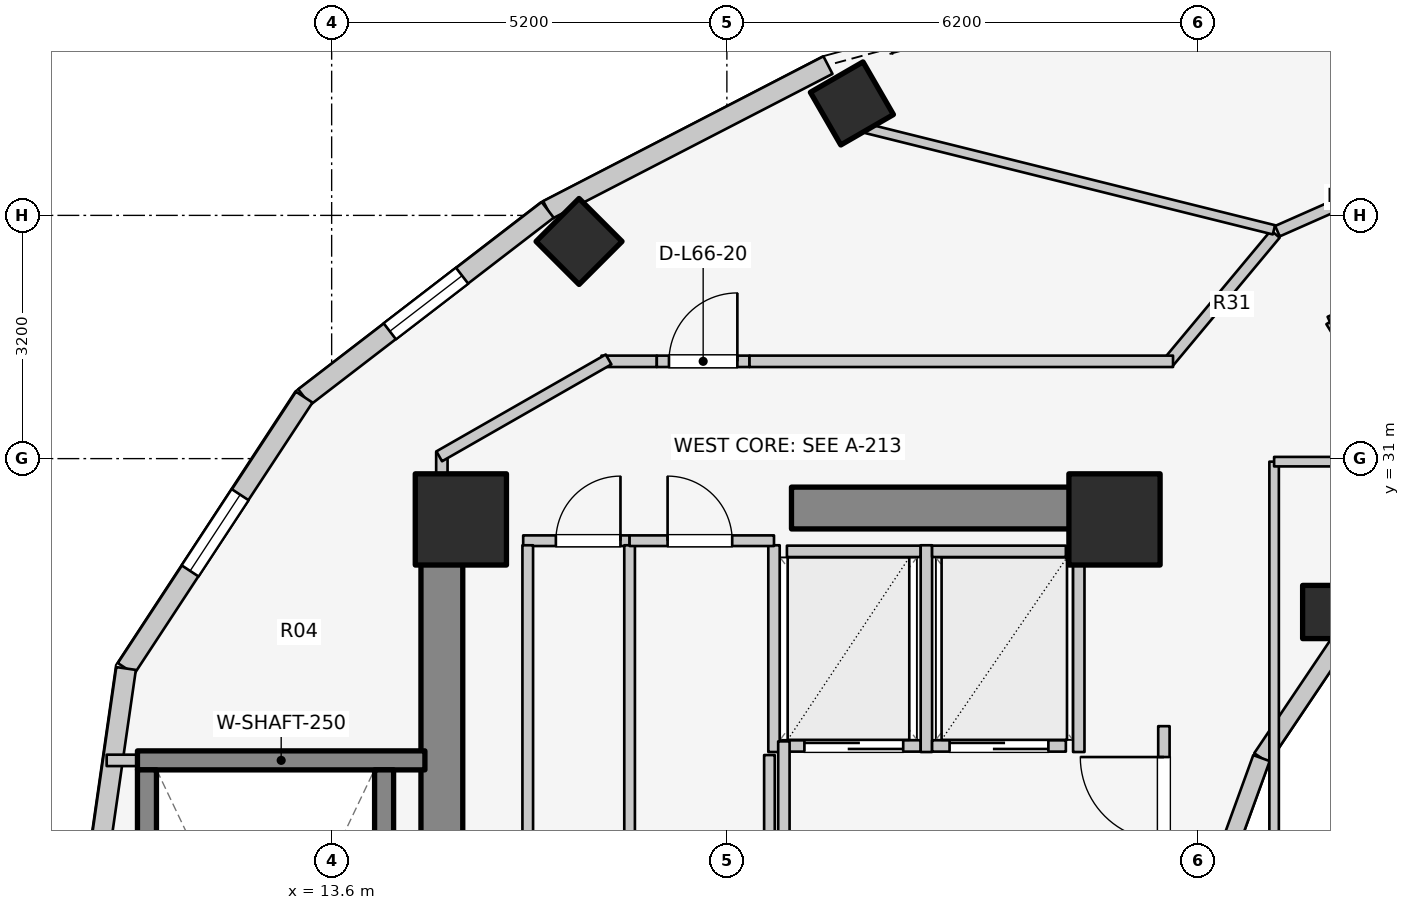
"""IFC4 building model, lengths in metres.
Left out: names, types, materials, properties, quantities, classifications, styles, units other than length and angle.
Written with IfcOpenShell. Run it as: python <this file> out.ifc"""

import sys

from ifc_helpers import new_model, si_unit, direction, frame, frame_2d, origin, origin_2d, place, context, subcontext, project, spatial, rectangle, extrude, element, fill, save


model = new_model("IFC4")
c1 = context("Model", 3, precision=1e-05, world=origin(), true_north=direction((0.0, 1.0)))
c2 = subcontext(c1, "Body", "Model", "MODEL_VIEW")
j1 = project(units=[si_unit("LENGTHUNIT", "METRE"), si_unit("PLANEANGLEUNIT", "RADIAN")], contexts=[c1])
p1 = place(None, origin())
s1 = spatial("IfcSite", under=j1, at=p1, CompositionType="ELEMENT")
p2 = place(p1, origin())
s2 = spatial("IfcBuilding", under=s1, at=p2, CompositionType="ELEMENT")
p3 = place(p2, frame((0.0, 0.0, 217.1)))
s3 = spatial("IfcBuildingStorey", under=s2, at=p3, CompositionType="ELEMENT", Elevation=217.1)
p4 = place(p3, frame((15.05, 17.05, 0.0), z_axis=(0.0, 0.0, 1.0), x_axis=(0.0, 1.0, 0.0)))
e1 = element("IfcWall", 1, at=p4, inside=s3, PredefinedType="SHEAR", context=c2, shape_type="SweptSolid", body=[
    extrude(rectangle(XDim=12.8, YDim=0.55, at=frame_2d((6.4, 0.0))), origin(), (0.0, 0.0, 1.0), 3.1),
])
p5 = place(p3, frame((19.65, 30.35, 0.0), z_axis=(0.0, 0.0, 1.0), x_axis=(1.0, 0.0, 0.0)))
e2 = element("IfcWall", 2, at=p5, inside=s3, PredefinedType="SHEAR", context=c2, shape_type="SweptSolid", body=[
    extrude(rectangle(XDim=4.5, YDim=0.55, at=frame_2d((2.25, 0.0))), origin(), (0.0, 0.0, 1.0), 3.1),
])
p6 = place(p3, frame((11.045, 27.03, 0.0), z_axis=(0.0, 0.0, 1.0), x_axis=(1.0, 0.0, 0.0)))
e3 = element("IfcWall", 3, at=p6, inside=s3, PredefinedType="SOLIDWALL", context=c2, shape_type="SweptSolid", body=[
    extrude(rectangle(XDim=3.782, YDim=0.25, at=frame_2d((1.891, 0.0))), origin(), (0.0, 0.0, 1.0), 3.1),
])
for number, where, z_axis, x_axis in (
    (4, (11.17, 19.095, 0.0), (0.0, 0.0, 1.0), (0.0, 1.0, 0.0)),
    (5, (14.29, 19.095, 0.0), (0.0, 0.0, 1.0), (0.0, 1.0, 0.0)),
):
    element("IfcWall", number, at=place(p3, frame(where, z_axis=z_axis, x_axis=x_axis)), inside=s3, PredefinedType="SOLIDWALL", context=c2, shape_type="SweptSolid", body=[
        extrude(rectangle(XDim=7.81, YDim=0.25, at=frame_2d((3.905, 0.0))), origin(), (0.0, 0.0, 1.0), 3.1),
    ])
for number, where, z_axis, x_axis in (
    (6, (23.9, 30.2, 0.0), (0.0, 0.0, 1.0), (1.0, 0.0, 0.0)),
    (7, (15.3, 30.2, 0.0), (0.0, 0.0, 1.0), (1.0, 0.0, 0.0)),
):
    element("IfcColumn", number, at=place(p3, frame(where, z_axis=z_axis, x_axis=x_axis)), inside=s3, PredefinedType="COLUMN", context=c2, shape_type="SweptSolid", body=[
        extrude(rectangle(XDim=1.2, YDim=1.2, at=origin_2d()), origin(), (0.0, 0.0, 1.0), 3.1),
    ])
p7 = place(p3, frame((20.445, 35.673, 0.0), z_axis=(0.0, 0.0, 1.0), x_axis=(-0.5, 0.866025403784, 0.0)))
e8 = element("IfcColumn", 8, at=p7, inside=s3, PredefinedType="COLUMN", context=c2, shape_type="SweptSolid", body=[
    extrude(rectangle(XDim=0.8, YDim=0.8, at=origin_2d()), origin(), (0.0, 0.0, 1.0), 3.1),
])
p8 = place(p3, frame((26.725, 28.982, 0.0), z_axis=(0.0, 0.0, 1.0), x_axis=(1.0, 0.0, 0.0)))
e9 = element("IfcColumn", 9, at=p8, inside=s3, PredefinedType="COLUMN", context=c2, shape_type="SweptSolid", body=[
    extrude(rectangle(XDim=0.7, YDim=0.7, at=origin_2d()), origin(), (0.0, 0.0, 1.0), 3.1),
])
p9 = place(p3, frame((16.855, 33.857, 0.0), z_axis=(0.0, 0.0, 1.0), x_axis=(-0.707106781187, 0.707106781187, 0.0)))
e10 = element("IfcColumn", 10, at=p9, inside=s3, PredefinedType="COLUMN", context=c2, shape_type="SweptSolid", body=[
    extrude(rectangle(XDim=0.8, YDim=0.8, at=origin_2d()), origin(), (0.0, 0.0, 1.0), 3.1),
])
p10 = place(p3, frame((26.965, 28.742, 0.0), z_axis=(0.0, 0.0, 1.0), x_axis=(-0.558197800898, -0.829707909492, 0.0)))
e11 = element("IfcWall", 11, at=p10, inside=s3, PredefinedType="STANDARD", context=c2, shape_type="SweptSolid", body=[
    extrude(rectangle(XDim=2.027, YDim=0.23, at=frame_2d((1.013, 0.0))), origin(), (0.0, 0.0, 1.0), 1.22),
])
p11 = place(p3, frame((25.834, 27.06, 0.0), z_axis=(0.0, 0.0, 1.0), x_axis=(-0.341423187295, -0.93990968033, 0.0)))
e12 = element("IfcWall", 12, at=p11, inside=s3, PredefinedType="STANDARD", context=c2, shape_type="SweptSolid", body=[
    extrude(rectangle(XDim=2.084, YDim=0.23, at=frame_2d((1.042, 0.0))), origin(), (0.0, 0.0, 1.0), 2.56),
])
p12 = place(p3, frame((20.13, 36.177, 0.0), z_axis=(0.0, 0.0, 1.0), x_axis=(-0.88849146803, -0.458893137057, 0.0)))
e13 = element("IfcWall", 13, at=p12, inside=s3, PredefinedType="STANDARD", context=c2, shape_type="SweptSolid", body=[
    extrude(rectangle(XDim=4.15, YDim=0.26, at=frame_2d((2.075, 0.0))), origin(), (0.0, 0.0, 1.0), 1.22),
])
p13 = place(p3, frame((16.442, 34.272, 0.0), z_axis=(0.0, 0.0, 1.0), x_axis=(-0.792713817907, -0.609593965603, 0.0)))
e14 = element("IfcWall", 14, at=p13, inside=s3, PredefinedType="STANDARD", context=c2, shape_type="SweptSolid", body=[
    extrude(rectangle(XDim=4.041, YDim=0.26, at=frame_2d((2.021, 0.0))), origin(), (0.0, 0.0, 1.0), 1.22),
])
p14 = place(p13, frame((1.42, 0.0, 0.15)))
e15 = element("IfcOpeningElement", 15, at=p14, cuts=e14, PredefinedType="OPENING", context=c2, shape_type="SweptSolid", body=[
    extrude(rectangle(XDim=1.2, YDim=0.9, at=frame_2d((0.6, 0.45))), frame((0.0, 0.14, 0.0), z_axis=(0.0, -1.0, 0.0), x_axis=(1.0, 0.0, 0.0)), (0.0, 0.0, 1.0), 0.28),
])
p15 = place(p3, frame((13.239, 31.809, 0.0), z_axis=(0.0, 0.0, 1.0), x_axis=(-0.548776305075, -0.835969238064, 0.0)))
e16 = element("IfcWall", 16, at=p15, inside=s3, PredefinedType="STANDARD", context=c2, shape_type="SweptSolid", body=[
    extrude(rectangle(XDim=4.271, YDim=0.26, at=frame_2d((2.135, 0.0))), origin(), (0.0, 0.0, 1.0), 1.22),
])
p16 = place(p15, frame((1.535, 0.0, 0.15)))
e17 = element("IfcOpeningElement", 17, at=p16, cuts=e16, PredefinedType="OPENING", context=c2, shape_type="SweptSolid", body=[
    extrude(rectangle(XDim=1.2, YDim=0.9, at=frame_2d((0.6, 0.45))), frame((0.0, 0.14, 0.0), z_axis=(0.0, -1.0, 0.0), x_axis=(1.0, 0.0, 0.0)), (0.0, 0.0, 1.0), 0.28),
])
p17 = place(p3, frame((10.895, 28.239, 0.0), z_axis=(0.0, 0.0, 1.0), x_axis=(-0.142712754019, -0.989764148593, 0.0)))
e18 = element("IfcWall", 18, at=p17, inside=s3, PredefinedType="STANDARD", context=c2, shape_type="SweptSolid", body=[
    extrude(rectangle(XDim=5.293, YDim=0.26, at=frame_2d((2.646, 0.0))), origin(), (0.0, 0.0, 1.0), 2.57),
])
p18 = place(p17, frame((2.635, 0.0, 0.75)))
e19 = element("IfcOpeningElement", 19, at=p18, cuts=e18, PredefinedType="OPENING", context=c2, shape_type="SweptSolid", body=[
    extrude(rectangle(XDim=1.2, YDim=1.5, at=frame_2d((0.6, 0.75))), frame((0.0, 0.14, 0.0), z_axis=(0.0, -1.0, 0.0), x_axis=(1.0, 0.0, 0.0)), (0.0, 0.0, 1.0), 0.28),
])
p19 = place(p3, frame((19.59, 27.22, 0.0), z_axis=(0.0, 0.0, 1.0), x_axis=(1.0, 0.0, 0.0)))
e20 = element("IfcWall", 20, at=p19, inside=s3, PredefinedType="SOLIDWALL", context=c2, shape_type="SweptSolid", body=[
    extrude(rectangle(XDim=1.76, YDim=0.15, at=frame_2d((0.88, 0.0))), origin(), (0.0, 0.0, 1.0), 2.575),
])
p20 = place(p19, frame((0.23, 0.0, 0.0)))
e21 = element("IfcOpeningElement", 21, at=p20, cuts=e20, PredefinedType="OPENING", context=c2, shape_type="SweptSolid", body=[
    extrude(rectangle(XDim=1.3, YDim=2.1, at=frame_2d((0.65, 1.05))), frame((0.0, 0.085, 0.0), z_axis=(0.0, -1.0, 0.0), x_axis=(1.0, 0.0, 0.0)), (0.0, 0.0, 1.0), 0.17),
])
p21 = place(p3, frame((19.59, 29.78, 0.0), z_axis=(0.0, 0.0, 1.0), x_axis=(1.0, 0.0, 0.0)))
e22 = element("IfcWall", 22, at=p21, inside=s3, PredefinedType="SOLIDWALL", context=c2, shape_type="SweptSolid", body=[
    extrude(rectangle(XDim=1.76, YDim=0.15, at=frame_2d((0.88, 0.0))), origin(), (0.0, 0.0, 1.0), 2.575),
])
for number, where, z_axis, x_axis in (
    (23, (19.42, 27.14, 0.0), (0.0, 0.0, 1.0), (0.0, 1.0, 0.0)),
    (24, (21.425, 27.14, 0.0), (0.0, 0.0, 1.0), (0.0, 1.0, 0.0)),
):
    element("IfcWall", number, at=place(p3, frame(where, z_axis=z_axis, x_axis=x_axis)), inside=s3, PredefinedType="SOLIDWALL", context=c2, shape_type="SweptSolid", body=[
        extrude(rectangle(XDim=2.72, YDim=0.15, at=frame_2d((1.36, 0.0))), origin(), (0.0, 0.0, 1.0), 2.575),
    ])
p22 = place(p3, frame((21.5, 27.22, 0.0), z_axis=(0.0, 0.0, 1.0), x_axis=(1.0, 0.0, 0.0)))
e25 = element("IfcWall", 25, at=p22, inside=s3, PredefinedType="SOLIDWALL", context=c2, shape_type="SweptSolid", body=[
    extrude(rectangle(XDim=1.76, YDim=0.15, at=frame_2d((0.88, 0.0))), origin(), (0.0, 0.0, 1.0), 2.575),
])
p23 = place(p22, frame((0.23, 0.0, 0.0)))
e26 = element("IfcOpeningElement", 26, at=p23, cuts=e25, PredefinedType="OPENING", context=c2, shape_type="SweptSolid", body=[
    extrude(rectangle(XDim=1.3, YDim=2.1, at=frame_2d((0.65, 1.05))), frame((0.0, 0.085, 0.0), z_axis=(0.0, -1.0, 0.0), x_axis=(1.0, 0.0, 0.0)), (0.0, 0.0, 1.0), 0.17),
])
p24 = place(p3, frame((21.5, 29.78, 0.0), z_axis=(0.0, 0.0, 1.0), x_axis=(1.0, 0.0, 0.0)))
e27 = element("IfcWall", 27, at=p24, inside=s3, PredefinedType="SOLIDWALL", context=c2, shape_type="SweptSolid", body=[
    extrude(rectangle(XDim=1.76, YDim=0.15, at=frame_2d((0.88, 0.0))), origin(), (0.0, 0.0, 1.0), 2.575),
])
p25 = place(p3, frame((23.43, 27.14, 0.0), z_axis=(0.0, 0.0, 1.0), x_axis=(0.0, 1.0, 0.0)))
e28 = element("IfcWall", 28, at=p25, inside=s3, PredefinedType="SOLIDWALL", context=c2, shape_type="SweptSolid", body=[
    extrude(rectangle(XDim=2.72, YDim=0.15, at=frame_2d((1.36, 0.0))), origin(), (0.0, 0.0, 1.0), 2.575),
])
p26 = place(p3, frame((19.55, 24.08, 0.0), z_axis=(0.0, 0.0, 1.0), x_axis=(0.0, 1.0, 0.0)))
e29 = element("IfcWall", 29, at=p26, inside=s3, PredefinedType="PARTITIONING", context=c2, shape_type="SweptSolid", body=[
    extrude(rectangle(XDim=3.2, YDim=0.15, at=frame_2d((1.6, 0.0))), origin(), (0.0, 0.0, 1.0), 2.575),
])
p27 = place(p3, frame((24.55, 24.08, 0.0), z_axis=(0.0, 0.0, 1.0), x_axis=(0.0, 1.0, 0.0)))
e30 = element("IfcWall", 30, at=p27, inside=s3, PredefinedType="PARTITIONING", context=c2, shape_type="SweptSolid", body=[
    extrude(rectangle(XDim=3.4, YDim=0.15, at=frame_2d((1.7, 0.0))), origin(), (0.0, 0.0, 1.0), 2.575),
])
p28 = place(p27, frame((1.894, 0.0, 0.0)))
e31 = element("IfcOpeningElement", 31, at=p28, cuts=e30, PredefinedType="OPENING", context=c2, shape_type="SweptSolid", body=[
    extrude(rectangle(XDim=1.1, YDim=2.1, at=frame_2d((0.55, 1.05))), frame((0.0, 0.085, 0.0), z_axis=(0.0, -1.0, 0.0), x_axis=(1.0, 0.0, 0.0)), (0.0, 0.0, 1.0), 0.17),
])
p29 = place(p3, frame((16.12, 29.92, 0.0), z_axis=(0.0, 0.0, 1.0), x_axis=(1.0, 0.0, 0.0)))
e32 = element("IfcWall", 32, at=p29, inside=s3, PredefinedType="PLUMBINGWALL", context=c2, shape_type="SweptSolid", body=[
    extrude(rectangle(XDim=1.4, YDim=0.14, at=frame_2d((0.7, 0.0))), origin(), (0.0, 0.0, 1.0), 2.575),
])
p30 = place(p29, frame((0.43, 0.0, 0.0)))
e33 = element("IfcOpeningElement", 33, at=p30, cuts=e32, PredefinedType="OPENING", context=c2, shape_type="SweptSolid", body=[
    extrude(rectangle(XDim=0.85, YDim=2.05, at=frame_2d((0.425, 1.025))), frame((0.0, 0.08, 0.0), z_axis=(0.0, -1.0, 0.0), x_axis=(1.0, 0.0, 0.0)), (0.0, 0.0, 1.0), 0.16),
])
for number, where, z_axis, x_axis in (
    (34, (16.18, 25.98, 0.0), (0.0, 0.0, 1.0), (0.0, 1.0, 0.0)),
    (35, (17.52, 25.98, 0.0), (0.0, 0.0, 1.0), (0.0, 1.0, 0.0)),
):
    element("IfcWall", number, at=place(p3, frame(where, z_axis=z_axis, x_axis=x_axis)), inside=s3, PredefinedType="PLUMBINGWALL", context=c2, shape_type="SweptSolid", body=[
        extrude(rectangle(XDim=3.88, YDim=0.14, at=frame_2d((1.94, 0.0))), origin(), (0.0, 0.0, 1.0), 2.575),
    ])
p31 = place(p3, frame((17.52, 29.92, 0.0), z_axis=(0.0, 0.0, 1.0), x_axis=(1.0, 0.0, 0.0)))
e36 = element("IfcWall", 36, at=p31, inside=s3, PredefinedType="PLUMBINGWALL", context=c2, shape_type="SweptSolid", body=[
    extrude(rectangle(XDim=1.9, YDim=0.14, at=frame_2d((0.95, 0.0))), origin(), (0.0, 0.0, 1.0), 2.575),
])
p32 = place(p31, frame((0.5, 0.0, 0.0)))
e37 = element("IfcOpeningElement", 37, at=p32, cuts=e36, PredefinedType="OPENING", context=c2, shape_type="SweptSolid", body=[
    extrude(rectangle(XDim=0.85, YDim=2.05, at=frame_2d((0.425, 1.025))), frame((0.0, 0.08, 0.0), z_axis=(0.0, -1.0, 0.0), x_axis=(1.0, 0.0, 0.0)), (0.0, 0.0, 1.0), 0.16),
])
p33 = place(p3, frame((19.36, 25.98, 0.0), z_axis=(0.0, 0.0, 1.0), x_axis=(0.0, 1.0, 0.0)))
e38 = element("IfcWall", 38, at=p33, inside=s3, PredefinedType="PLUMBINGWALL", context=c2, shape_type="SweptSolid", body=[
    extrude(rectangle(XDim=1.12, YDim=0.14, at=frame_2d((0.56, 0.0))), origin(), (0.0, 0.0, 1.0), 2.575),
])
p34 = place(p3, frame((28.45, 30.015, 0.0), z_axis=(0.0, 0.0, 1.0), x_axis=(-0.522763432117, 0.852477796802, 0.0)))
e39 = element("IfcWall", 39, at=p34, inside=s3, PredefinedType="PARTITIONING", context=c2, shape_type="SweptSolid", body=[
    extrude(rectangle(XDim=3.269, YDim=0.125, at=frame_2d((1.635, 0.0))), origin(), (0.0, 0.0, 1.0), 1.22),
])
p35 = place(p3, frame((27.858, 33.299, 0.0), z_axis=(0.0, 0.0, 1.0), x_axis=(-0.91321306925, -0.407482380172, 0.0)))
e40 = element("IfcWall", 40, at=p35, inside=s3, PredefinedType="PARTITIONING", context=c2, shape_type="SweptSolid", body=[
    extrude(rectangle(XDim=1.23, YDim=0.15, at=frame_2d((0.615, 0.0))), origin(), (0.0, 0.0, 1.0), 2.16),
])
p36 = place(p35, frame((0.16, 0.0, 0.0)))
e41 = element("IfcOpeningElement", 41, at=p36, cuts=e40, PredefinedType="OPENING", context=c2, shape_type="SweptSolid", body=[
    extrude(rectangle(XDim=0.95, YDim=2.1, at=frame_2d((0.475, 1.05))), frame((0.0, 0.085, 0.0), z_axis=(0.0, -1.0, 0.0), x_axis=(1.0, 0.0, 0.0)), (0.0, 0.0, 1.0), 0.17),
])
p37 = place(p3, frame((26.0, 25.8, 0.0), z_axis=(0.0, 0.0, 1.0), x_axis=(0.0, 1.0, 0.0)))
e42 = element("IfcWall", 42, at=p37, inside=s3, PredefinedType="PARTITIONING", context=c2, shape_type="SweptSolid", body=[
    extrude(rectangle(XDim=5.16, YDim=0.125, at=frame_2d((2.58, 0.0))), origin(), (0.0, 0.0, 1.0), 1.952),
])
p38 = place(p3, frame((26.0, 30.96, 0.0), z_axis=(0.0, 0.0, 1.0), x_axis=(1.0, 0.0, 0.0)))
e43 = element("IfcWall", 43, at=p38, inside=s3, PredefinedType="PARTITIONING", context=c2, shape_type="SweptSolid", body=[
    extrude(rectangle(XDim=2.6, YDim=0.125, at=frame_2d((1.3, 0.0))), origin(), (0.0, 0.0, 1.0), 1.22),
])
p39 = place(p3, frame((10.64, 27.03, 0.0), z_axis=(0.0, 0.0, 1.0), x_axis=(1.0, 0.0, 0.0)))
e44 = element("IfcWall", 44, at=p39, inside=s3, PredefinedType="PARTITIONING", context=c2, shape_type="SweptSolid", body=[
    extrude(rectangle(XDim=0.4, YDim=0.15, at=frame_2d((0.2, 0.0))), origin(), (0.0, 0.0, 1.0), 2.575),
])
p40 = place(p3, frame((15.05, 29.8, 0.0), z_axis=(0.0, 0.0, 1.0), x_axis=(0.0, 1.0, 0.0)))
e45 = element("IfcWall", 45, at=p40, inside=s3, PredefinedType="PARTITIONING", context=c2, shape_type="SweptSolid", body=[
    extrude(rectangle(XDim=1.29, YDim=0.15, at=frame_2d((0.645, 0.0))), origin(), (0.0, 0.0, 1.0), 1.22),
])
p41 = place(p3, frame((26.016, 33.955, 0.0), z_axis=(0.0, 0.0, 1.0), x_axis=(-0.64030392053, -0.76812166312, 0.0)))
e46 = element("IfcWall", 46, at=p41, inside=s3, PredefinedType="PARTITIONING", context=c2, shape_type="SweptSolid", body=[
    extrude(rectangle(XDim=2.21, YDim=0.15, at=frame_2d((1.105, 0.0))), origin(), (0.0, 0.0, 1.0), 1.22),
])
p42 = place(p3, frame((17.15, 32.28, 0.0), z_axis=(0.0, 0.0, 1.0), x_axis=(1.0, 0.0, 0.0)))
e47 = element("IfcWall", 47, at=p42, inside=s3, PredefinedType="PARTITIONING", context=c2, shape_type="SweptSolid", body=[
    extrude(rectangle(XDim=0.728, YDim=0.15, at=frame_2d((0.364, 0.0))), origin(), (0.0, 0.0, 1.0), 2.575),
])
p43 = place(p3, frame((17.878, 32.28, 0.0), z_axis=(0.0, 0.0, 1.0), x_axis=(1.0, 0.0, 0.0)))
e48 = element("IfcWall", 48, at=p43, inside=s3, PredefinedType="PARTITIONING", context=c2, shape_type="SweptSolid", body=[
    extrude(rectangle(XDim=1.22, YDim=0.15, at=frame_2d((0.61, 0.0))), origin(), (0.0, 0.0, 1.0), 2.16),
])
p44 = place(p43, frame((0.16, 0.0, 0.0)))
e49 = element("IfcOpeningElement", 49, at=p44, cuts=e48, PredefinedType="OPENING", context=c2, shape_type="SweptSolid", body=[
    extrude(rectangle(XDim=0.9, YDim=2.1, at=frame_2d((0.45, 1.05))), frame((0.0, 0.085, 0.0), z_axis=(0.0, -1.0, 0.0), x_axis=(1.0, 0.0, 0.0)), (0.0, 0.0, 1.0), 0.17),
])
p45 = place(p3, frame((19.098, 32.28, 0.0), z_axis=(0.0, 0.0, 1.0), x_axis=(1.0, 0.0, 0.0)))
e50 = element("IfcWall", 50, at=p45, inside=s3, PredefinedType="PARTITIONING", context=c2, shape_type="SweptSolid", body=[
    extrude(rectangle(XDim=5.572, YDim=0.15, at=frame_2d((2.786, 0.0))), origin(), (0.0, 0.0, 1.0), 1.22),
])
p46 = place(p3, frame((17.243, 32.305, 0.0), z_axis=(0.0, 0.0, 1.0), x_axis=(-0.867991349648, -0.496579315857, 0.0)))
e51 = element("IfcWall", 51, at=p46, inside=s3, PredefinedType="PARTITIONING", context=c2, shape_type="SweptSolid", body=[
    extrude(rectangle(XDim=2.567, YDim=0.15, at=frame_2d((1.283, 0.0))), origin(), (0.0, 0.0, 1.0), 1.22),
])
p47 = place(p3, frame((25.998, 34.01, 0.0), z_axis=(0.0, 0.0, 1.0), x_axis=(-0.970445810114, 0.241319144769, 0.0)))
e52 = element("IfcWall", 52, at=p47, inside=s3, PredefinedType="PARTITIONING", context=c2, shape_type="SweptSolid", body=[
    extrude(rectangle(XDim=5.526, YDim=0.125, at=frame_2d((2.763, 0.0))), origin(), (0.0, 0.0, 1.0), 1.22),
])
p48 = place(p3, frame((28.929, 35.268, 0.0), z_axis=(0.0, 0.0, 1.0), x_axis=(-0.914642679993, -0.404263240891, 0.0)))
e53 = element("IfcWall", 53, at=p48, inside=s3, PredefinedType="PARTITIONING", context=c2, shape_type="SweptSolid", body=[
    extrude(rectangle(XDim=3.154, YDim=0.15, at=frame_2d((1.577, 0.0))), origin(), (0.0, 0.0, 1.0), 1.22),
])
p49 = place(p14, origin())
e54 = element("IfcWindow", 54, at=p49, inside=s3, PartitioningType="SINGLE_PANEL", PredefinedType="WINDOW", context=c2, shape_type="SweptSolid", body=[
    extrude(rectangle(XDim=1.2, YDim=0.9, at=frame_2d((0.6, 0.45))), frame((0.0, 0.03, 0.0), z_axis=(0.0, -1.0, 0.0), x_axis=(1.0, 0.0, 0.0)), (0.0, 0.0, 1.0), 0.06),
])
fill(e15, e54)
p50 = place(p16, origin())
e55 = element("IfcWindow", 55, at=p50, inside=s3, PartitioningType="SINGLE_PANEL", PredefinedType="WINDOW", context=c2, shape_type="SweptSolid", body=[
    extrude(rectangle(XDim=1.2, YDim=0.9, at=frame_2d((0.6, 0.45))), frame((0.0, 0.03, 0.0), z_axis=(0.0, -1.0, 0.0), x_axis=(1.0, 0.0, 0.0)), (0.0, 0.0, 1.0), 0.06),
])
fill(e17, e55)
p51 = place(p20, origin())
e56 = element("IfcDoor", 56, at=p51, inside=s3, OperationType="DOUBLE_DOOR_SLIDING", PredefinedType="DOOR", context=c2, shape_type="SweptSolid", body=[
    extrude(rectangle(XDim=1.3, YDim=2.1, at=frame_2d((0.65, 1.05))), frame((0.0, 0.025, 0.0), z_axis=(0.0, -1.0, 0.0), x_axis=(1.0, 0.0, 0.0)), (0.0, 0.0, 1.0), 0.05),
])
fill(e21, e56)
p52 = place(p23, origin())
e57 = element("IfcDoor", 57, at=p52, inside=s3, OperationType="DOUBLE_DOOR_SLIDING", PredefinedType="DOOR", context=c2, shape_type="SweptSolid", body=[
    extrude(rectangle(XDim=1.3, YDim=2.1, at=frame_2d((0.65, 1.05))), frame((0.0, 0.025, 0.0), z_axis=(0.0, -1.0, 0.0), x_axis=(1.0, 0.0, 0.0)), (0.0, 0.0, 1.0), 0.05),
])
fill(e26, e57)
p53 = place(p28, origin())
e58 = element("IfcDoor", 58, at=p53, inside=s3, OperationType="SINGLE_SWING_RIGHT", PredefinedType="DOOR", context=c2, shape_type="SweptSolid", body=[
    extrude(rectangle(XDim=1.1, YDim=2.1, at=frame_2d((0.55, 1.05))), frame((0.0, 0.025, 0.0), z_axis=(0.0, -1.0, 0.0), x_axis=(1.0, 0.0, 0.0)), (0.0, 0.0, 1.0), 0.05),
])
fill(e31, e58)
p54 = place(p30, origin())
e59 = element("IfcDoor", 59, at=p54, inside=s3, OperationType="SINGLE_SWING_RIGHT", PredefinedType="DOOR", context=c2, shape_type="SweptSolid", body=[
    extrude(rectangle(XDim=0.85, YDim=2.05, at=frame_2d((0.425, 1.025))), frame((0.0, 0.025, 0.0), z_axis=(0.0, -1.0, 0.0), x_axis=(1.0, 0.0, 0.0)), (0.0, 0.0, 1.0), 0.05),
])
fill(e33, e59)
p55 = place(p32, origin())
e60 = element("IfcDoor", 60, at=p55, inside=s3, OperationType="SINGLE_SWING_LEFT", PredefinedType="DOOR", context=c2, shape_type="SweptSolid", body=[
    extrude(rectangle(XDim=0.85, YDim=2.05, at=frame_2d((0.425, 1.025))), frame((0.0, 0.025, 0.0), z_axis=(0.0, -1.0, 0.0), x_axis=(1.0, 0.0, 0.0)), (0.0, 0.0, 1.0), 0.05),
])
fill(e37, e60)
p56 = place(p44, origin())
e61 = element("IfcDoor", 61, at=p56, inside=s3, OperationType="SINGLE_SWING_RIGHT", PredefinedType="DOOR", context=c2, shape_type="SweptSolid", body=[
    extrude(rectangle(XDim=0.9, YDim=2.1, at=frame_2d((0.45, 1.05))), frame((0.0, 0.025, 0.0), z_axis=(0.0, -1.0, 0.0), x_axis=(1.0, 0.0, 0.0)), (0.0, 0.0, 1.0), 0.05),
])
fill(e49, e61)
save(model, sys.argv[1])
